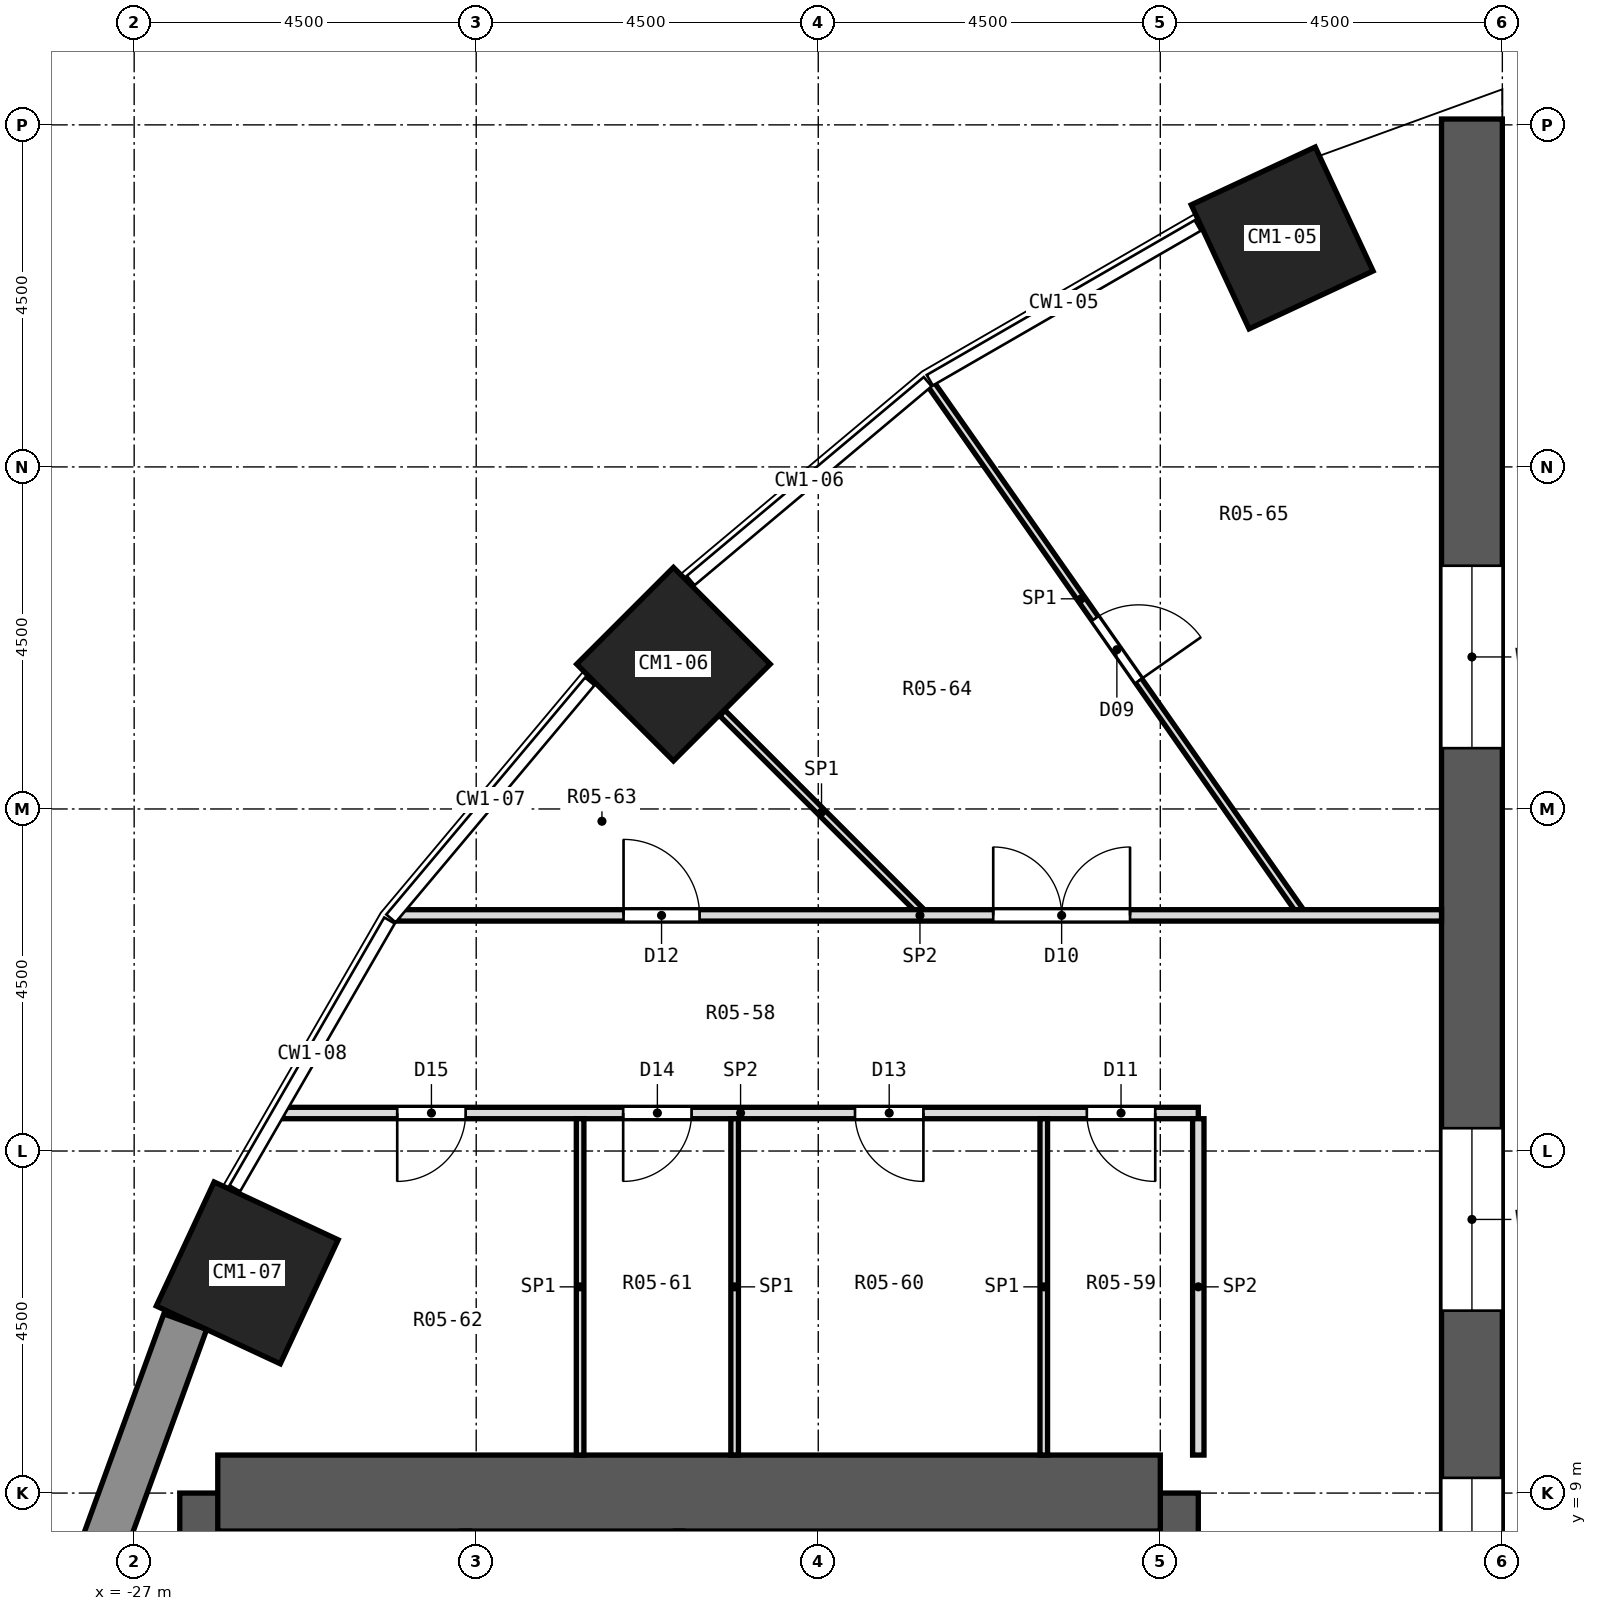
"""IFC4 building model, lengths in metres.
Left out: names, types, materials, properties, quantities, classifications, styles, units other than length and angle.
Written with IfcOpenShell. Run it as: python <this file> out.ifc"""

import sys

from ifc_helpers import new_model, si_unit, direction, frame, frame_2d, origin, origin_2d, place, context, subcontext, project, spatial, polyline, rectangle, outline, extrude, element, fill, save


model = new_model("IFC4")
c1 = context("Model", 3, precision=1e-05, world=origin(), true_north=direction((0.0, 1.0)))
c2 = subcontext(c1, "Body", "Model", "MODEL_VIEW")
j1 = project(units=[si_unit("LENGTHUNIT", "METRE"), si_unit("PLANEANGLEUNIT", "RADIAN")], contexts=[c1])
p1 = place(None, origin())
s1 = spatial("IfcSite", under=j1, at=p1, CompositionType="ELEMENT")
p2 = place(p1, origin())
s2 = spatial("IfcBuilding", under=s1, at=p2, CompositionType="ELEMENT")
p3 = place(p2, frame((0.0, 0.0, 9.2)))
s3 = spatial("IfcBuildingStorey", under=s2, at=p3, CompositionType="ELEMENT", Elevation=9.2)
for number, where, z_axis, x_axis in (
    (1, (-11.897, 25.512, 0.0), (0.0, 0.0, 1.0), (-0.423, 0.906, 0.0)),
    (2, (-19.905, 19.905, 0.0), (0.0, 0.0, 1.0), (-0.707, 0.707, 0.0)),
    (3, (-25.512, 11.897, 0.0), (0.0, 0.0, 1.0), (-0.906, 0.423, 0.0)),
):
    element("IfcColumn", number, at=place(p3, frame(where, z_axis=z_axis, x_axis=x_axis)), inside=s3, PredefinedType="COLUMN", context=c2, shape_type="SweptSolid", body=[
        extrude(rectangle(XDim=1.8, YDim=1.8, at=origin_2d()), origin(), (0.0, 0.0, 1.0), 4.2),
    ])
p4 = place(p3, frame((-13.5, -9.0, 0.0), z_axis=(0.0, 0.0, 1.0), x_axis=(0.0, 1.0, 0.0)))
e4 = element("IfcWall", 4, at=p4, inside=s3, PredefinedType="SHEAR", context=c2, shape_type="SweptSolid", body=[
    extrude(rectangle(XDim=18.0, YDim=1.0, at=frame_2d((9.0, 0.0))), origin(), (0.0, 0.0, 1.0), 4.2),
])
p5 = place(p4, frame((15.4, 0.0, 0.0)))
e5 = element("IfcOpeningElement", 5, at=p5, cuts=e4, PredefinedType="OPENING", context=c2, shape_type="SweptSolid", body=[
    extrude(rectangle(XDim=1.2, YDim=2.1, at=frame_2d((0.6, 1.05))), frame((0.0, 0.512, 0.0), z_axis=(0.0, -1.0, 0.0), x_axis=(1.0, 0.0, 0.0)), (0.0, 0.0, 1.0), 1.024),
])
p6 = place(p4, frame((1.4, 0.0, 0.0)))
e6 = element("IfcOpeningElement", 6, at=p6, cuts=e4, PredefinedType="OPENING", context=c2, shape_type="SweptSolid", body=[
    extrude(rectangle(XDim=1.2, YDim=2.1, at=frame_2d((0.6, 1.05))), frame((0.0, 0.512, 0.0), z_axis=(0.0, -1.0, 0.0), x_axis=(1.0, 0.0, 0.0)), (0.0, 0.0, 1.0), 1.024),
])
p7 = place(p4, frame((7.5, 0.0, 0.0)))
e7 = element("IfcOpeningElement", 7, at=p7, cuts=e4, PredefinedType="OPENING", context=c2, shape_type="SweptSolid", body=[
    extrude(rectangle(XDim=3.0, YDim=2.4, at=frame_2d((1.5, 1.2))), frame((0.0, 0.512, 0.0), z_axis=(0.0, -1.0, 0.0), x_axis=(1.0, 0.0, 0.0)), (0.0, 0.0, 1.0), 1.024),
])
p8 = place(p3, frame((-25.9, -9.0, 0.0), z_axis=(0.0, 0.0, 1.0), x_axis=(0.0, 1.0, 0.0)))
e8 = element("IfcWall", 8, at=p8, inside=s3, PredefinedType="SHEAR", context=c2, shape_type="SweptSolid", body=[
    extrude(rectangle(XDim=18.0, YDim=1.0, at=frame_2d((9.0, 0.0))), origin(), (0.0, 0.0, 1.0), 4.2),
])
p9 = place(p3, frame((-13.5, 9.0, 0.0), z_axis=(0.0, 0.0, 1.0), x_axis=(-1.0, 0.0, 0.0)))
e9 = element("IfcWall", 9, at=p9, inside=s3, PredefinedType="SHEAR", context=c2, shape_type="SweptSolid", body=[
    extrude(rectangle(XDim=12.4, YDim=1.0, at=frame_2d((6.2, 0.0))), origin(), (0.0, 0.0, 1.0), 4.2),
])
p10 = place(p3, frame((-9.4, -27.077, 0.0), z_axis=(0.0, 0.0, 1.0), x_axis=(0.0, 1.0, 0.0)))
e10 = element("IfcWall", 10, at=p10, inside=s3, PredefinedType="SHEAR", context=c2, shape_type="SweptSolid", body=[
    extrude(rectangle(XDim=54.154, YDim=0.8, at=frame_2d((27.077, 0.0))), origin(), (0.0, 0.0, 1.0), 4.2),
])
p11 = place(p10, frame((13.277, 0.0, 0.9)))
e11 = element("IfcOpeningElement", 11, at=p11, cuts=e10, PredefinedType="OPENING", context=c2, shape_type="SweptSolid", body=[
    extrude(rectangle(XDim=2.4, YDim=2.1, at=frame_2d((1.2, 1.05))), frame((0.0, 0.412, 0.0), z_axis=(0.0, -1.0, 0.0), x_axis=(1.0, 0.0, 0.0)), (0.0, 0.0, 1.0), 0.824),
])
p12 = place(p10, frame((17.877, 0.0, 0.9)))
e12 = element("IfcOpeningElement", 12, at=p12, cuts=e10, PredefinedType="OPENING", context=c2, shape_type="SweptSolid", body=[
    extrude(rectangle(XDim=2.4, YDim=2.1, at=frame_2d((1.2, 1.05))), frame((0.0, 0.412, 0.0), z_axis=(0.0, -1.0, 0.0), x_axis=(1.0, 0.0, 0.0)), (0.0, 0.0, 1.0), 0.824),
])
p13 = place(p10, frame((22.477, 0.0, 0.9)))
e13 = element("IfcOpeningElement", 13, at=p13, cuts=e10, PredefinedType="OPENING", context=c2, shape_type="SweptSolid", body=[
    extrude(rectangle(XDim=2.4, YDim=2.1, at=frame_2d((1.2, 1.05))), frame((0.0, 0.412, 0.0), z_axis=(0.0, -1.0, 0.0), x_axis=(1.0, 0.0, 0.0)), (0.0, 0.0, 1.0), 0.824),
])
p14 = place(p10, frame((29.277, 0.0, 0.9)))
e14 = element("IfcOpeningElement", 14, at=p14, cuts=e10, PredefinedType="OPENING", context=c2, shape_type="SweptSolid", body=[
    extrude(rectangle(XDim=2.4, YDim=2.1, at=frame_2d((1.2, 1.05))), frame((0.0, 0.412, 0.0), z_axis=(0.0, -1.0, 0.0), x_axis=(1.0, 0.0, 0.0)), (0.0, 0.0, 1.0), 0.824),
])
p15 = place(p10, frame((33.877, 0.0, 0.9)))
e15 = element("IfcOpeningElement", 15, at=p15, cuts=e10, PredefinedType="OPENING", context=c2, shape_type="SweptSolid", body=[
    extrude(rectangle(XDim=2.4, YDim=2.1, at=frame_2d((1.2, 1.05))), frame((0.0, 0.412, 0.0), z_axis=(0.0, -1.0, 0.0), x_axis=(1.0, 0.0, 0.0)), (0.0, 0.0, 1.0), 0.824),
])
p16 = place(p10, frame((38.477, 0.0, 0.9)))
e16 = element("IfcOpeningElement", 16, at=p16, cuts=e10, PredefinedType="OPENING", context=c2, shape_type="SweptSolid", body=[
    extrude(rectangle(XDim=2.4, YDim=2.1, at=frame_2d((1.2, 1.05))), frame((0.0, 0.412, 0.0), z_axis=(0.0, -1.0, 0.0), x_axis=(1.0, 0.0, 0.0)), (0.0, 0.0, 1.0), 0.824),
])
p17 = place(p10, frame((5.877, 0.0, 0.9)))
e17 = element("IfcOpeningElement", 17, at=p17, cuts=e10, PredefinedType="OPENING", context=c2, shape_type="SweptSolid", body=[
    extrude(rectangle(XDim=2.4, YDim=2.1, at=frame_2d((1.2, 1.05))), frame((0.0, 0.412, 0.0), z_axis=(0.0, -1.0, 0.0), x_axis=(1.0, 0.0, 0.0)), (0.0, 0.0, 1.0), 0.824),
])
p18 = place(p10, frame((45.877, 0.0, 0.9)))
e18 = element("IfcOpeningElement", 18, at=p18, cuts=e10, PredefinedType="OPENING", context=c2, shape_type="SweptSolid", body=[
    extrude(rectangle(XDim=2.4, YDim=2.1, at=frame_2d((1.2, 1.05))), frame((0.0, 0.412, 0.0), z_axis=(0.0, -1.0, 0.0), x_axis=(1.0, 0.0, 0.0)), (0.0, 0.0, 1.0), 0.824),
])
p19 = place(p3, frame((-26.328, 11.255, 0.0), z_axis=(0.0, 0.0, 1.0), x_axis=(-0.342034744565, -0.939687306241, 0.0)))
e19 = element("IfcWall", 19, at=p19, inside=s3, PredefinedType="SOLIDWALL", context=c2, shape_type="SweptSolid", body=[
    extrude(rectangle(XDim=4.099, YDim=0.6, at=frame_2d((2.05, 0.0))), origin(), (0.0, 0.0, 1.0), 3.65),
])
p20 = place(p3, frame((-11.634, 26.49, 0.0), z_axis=(-0.342078632434, 0.939669193197, 0.002004142629), x_axis=(0.939671080385, 0.342079319292, 7.3534e-08)))
e20 = element("IfcWall", 20, at=p20, inside=s3, PredefinedType="SOLIDWALL", context=c2, shape_type="SweptSolid", body=[
    extrude(outline(polyline([(0.0, 0.0), (1.949, -2.168e-19), (2.015, -0.343), (2.328, -1.495), (2.727, -2.622), (3.211, -3.719), (3.467, -4.2), (2.81, -4.2), (2.81, -3.65), (-4.405e-05, -3.65), (0.0, 0.0)])), origin(), (0.0, 0.0, -1.0), 0.38),
])
p21 = place(p3, frame((-16.519, 23.591, 0.0), z_axis=(0.0, 0.0, 1.0), x_axis=(0.573574670768, -0.819153280561, 0.0)))
e21 = element("IfcWall", 21, at=p21, inside=s3, PredefinedType="PARTITIONING", context=c2, shape_type="SweptSolid", body=[
    extrude(rectangle(XDim=8.46, YDim=0.1, at=frame_2d((4.23, 0.0))), origin(), (0.0, 0.0, 1.0), 3.65),
])
p22 = place(p21, frame((3.768, 0.0, 0.0)))
e22 = element("IfcOpeningElement", 22, at=p22, cuts=e21, PredefinedType="OPENING", context=c2, shape_type="SweptSolid", body=[
    extrude(rectangle(XDim=1.0, YDim=2.1, at=frame_2d((0.5, 1.05))), frame((0.0, 0.062, 0.0), z_axis=(0.0, -1.0, 0.0), x_axis=(1.0, 0.0, 0.0)), (0.0, 0.0, 1.0), 0.124),
])
p23 = place(p3, frame((-19.262, 19.262, 0.0), z_axis=(0.0, 0.0, 1.0), x_axis=(0.707106781187, -0.707106781187, 0.0)))
e23 = element("IfcWall", 23, at=p23, inside=s3, PredefinedType="PARTITIONING", context=c2, shape_type="SweptSolid", body=[
    extrude(rectangle(XDim=3.689, YDim=0.1, at=frame_2d((1.845, 0.0))), origin(), (0.0, 0.0, 1.0), 3.65),
])
p24 = place(p3, frame((-25.045, 14.0, 0.0), z_axis=(0.0, 0.0, 1.0), x_axis=(1.0, 0.0, 0.0)))
e24 = element("IfcWall", 24, at=p24, inside=s3, PredefinedType="PARTITIONING", context=c2, shape_type="SweptSolid", body=[
    extrude(rectangle(XDim=12.045, YDim=0.15, at=frame_2d((6.022, 0.0))), origin(), (0.0, 0.0, 1.0), 3.65),
])
p25 = place(p24, frame((10.579, 0.0, 0.0)))
e25 = element("IfcOpeningElement", 25, at=p25, cuts=e24, PredefinedType="OPENING", context=c2, shape_type="SweptSolid", body=[
    extrude(rectangle(XDim=0.9, YDim=2.1, at=frame_2d((0.45, 1.05))), frame((0.0, 0.087, 0.0), z_axis=(0.0, -1.0, 0.0), x_axis=(1.0, 0.0, 0.0)), (0.0, 0.0, 1.0), 0.174),
])
p26 = place(p24, frame((7.529, 0.0, 0.0)))
e26 = element("IfcOpeningElement", 26, at=p26, cuts=e24, PredefinedType="OPENING", context=c2, shape_type="SweptSolid", body=[
    extrude(rectangle(XDim=0.9, YDim=2.1, at=frame_2d((0.45, 1.05))), frame((0.0, 0.087, 0.0), z_axis=(0.0, -1.0, 0.0), x_axis=(1.0, 0.0, 0.0)), (0.0, 0.0, 1.0), 0.174),
])
p27 = place(p24, frame((4.479, 0.0, 0.0)))
e27 = element("IfcOpeningElement", 27, at=p27, cuts=e24, PredefinedType="OPENING", context=c2, shape_type="SweptSolid", body=[
    extrude(rectangle(XDim=0.9, YDim=2.1, at=frame_2d((0.45, 1.05))), frame((0.0, 0.087, 0.0), z_axis=(0.0, -1.0, 0.0), x_axis=(1.0, 0.0, 0.0)), (0.0, 0.0, 1.0), 0.174),
])
p28 = place(p24, frame((1.506, 0.0, 0.0)))
e28 = element("IfcOpeningElement", 28, at=p28, cuts=e24, PredefinedType="OPENING", context=c2, shape_type="SweptSolid", body=[
    extrude(rectangle(XDim=0.9, YDim=2.1, at=frame_2d((0.45, 1.05))), frame((0.0, 0.087, 0.0), z_axis=(0.0, -1.0, 0.0), x_axis=(1.0, 0.0, 0.0)), (0.0, 0.0, 1.0), 0.174),
])
p29 = place(p3, frame((-23.523, 16.6, 0.0), z_axis=(0.0, 0.0, 1.0), x_axis=(1.0, 0.0, 0.0)))
e29 = element("IfcWall", 29, at=p29, inside=s3, PredefinedType="PARTITIONING", context=c2, shape_type="SweptSolid", body=[
    extrude(rectangle(XDim=13.723, YDim=0.15, at=frame_2d((6.861, 0.0))), origin(), (0.0, 0.0, 1.0), 3.65),
])
p30 = place(p29, frame((7.825, 0.0, 0.0)))
e30 = element("IfcOpeningElement", 30, at=p30, cuts=e29, PredefinedType="OPENING", context=c2, shape_type="SweptSolid", body=[
    extrude(rectangle(XDim=1.8, YDim=2.1, at=frame_2d((0.9, 1.05))), frame((0.0, 0.087, 0.0), z_axis=(0.0, -1.0, 0.0), x_axis=(1.0, 0.0, 0.0)), (0.0, 0.0, 1.0), 0.174),
])
p31 = place(p29, frame((2.961, 0.0, 0.0)))
e31 = element("IfcOpeningElement", 31, at=p31, cuts=e29, PredefinedType="OPENING", context=c2, shape_type="SweptSolid", body=[
    extrude(rectangle(XDim=1.0, YDim=2.1, at=frame_2d((0.5, 1.05))), frame((0.0, 0.087, 0.0), z_axis=(0.0, -1.0, 0.0), x_axis=(1.0, 0.0, 0.0)), (0.0, 0.0, 1.0), 0.174),
])
p32 = place(p3, frame((-13.0, 9.5, 0.0), z_axis=(0.0, 0.0, 1.0), x_axis=(0.0, 1.0, 0.0)))
e32 = element("IfcWall", 32, at=p32, inside=s3, PredefinedType="PARTITIONING", context=c2, shape_type="SweptSolid", body=[
    extrude(rectangle(XDim=4.425, YDim=0.15, at=frame_2d((2.212, 0.0))), origin(), (0.0, 0.0, 1.0), 3.65),
])
for number, where, z_axis, x_axis in (
    (33, (-15.033, 9.5, 0.0), (0.0, 0.0, 1.0), (0.0, 1.0, 0.0)),
    (34, (-19.1, 9.5, 0.0), (0.0, 0.0, 1.0), (0.0, 1.0, 0.0)),
    (35, (-21.133, 9.5, 0.0), (0.0, 0.0, 1.0), (0.0, 1.0, 0.0)),
):
    element("IfcWall", number, at=place(p3, frame(where, z_axis=z_axis, x_axis=x_axis)), inside=s3, PredefinedType="PARTITIONING", context=c2, shape_type="SweptSolid", body=[
        extrude(rectangle(XDim=4.425, YDim=0.1, at=frame_2d((2.212, 0.0))), origin(), (0.0, 0.0, 1.0), 3.65),
    ])
p33 = place(p3, frame((-19.83, 5.3, 0.0), z_axis=(0.0, 0.0, 1.0), x_axis=(0.0, 1.0, 0.0)))
e36 = element("IfcWall", 36, at=p33, inside=s3, PredefinedType="PARTITIONING", context=c2, shape_type="SweptSolid", body=[
    extrude(rectangle(XDim=3.2, YDim=0.1, at=frame_2d((1.6, 0.0))), origin(), (0.0, 0.0, 1.0), 3.65),
])
p34 = place(p3, frame((-22.64, 5.3, 0.0), z_axis=(0.0, 0.0, 1.0), x_axis=(0.0, 1.0, 0.0)))
e37 = element("IfcWall", 37, at=p34, inside=s3, PredefinedType="PARTITIONING", context=c2, shape_type="SweptSolid", body=[
    extrude(rectangle(XDim=3.2, YDim=0.1, at=frame_2d((1.6, 0.0))), origin(), (0.0, 0.0, 1.0), 3.65),
])
p35 = place(p34, frame((1.15, 0.0, 0.0)))
e38 = element("IfcOpeningElement", 38, at=p35, cuts=e37, PredefinedType="OPENING", context=c2, shape_type="SweptSolid", body=[
    extrude(rectangle(XDim=0.9, YDim=2.1, at=frame_2d((0.45, 1.05))), frame((0.0, 0.062, 0.0), z_axis=(0.0, -1.0, 0.0), x_axis=(1.0, 0.0, 0.0)), (0.0, 0.0, 1.0), 0.124),
])
p36 = place(p22, origin())
e39 = element("IfcDoor", 39, at=p36, inside=s3, OperationType="SINGLE_SWING_RIGHT", PredefinedType="DOOR", context=c2, shape_type="SweptSolid", body=[
    extrude(rectangle(XDim=1.0, YDim=2.1, at=frame_2d((0.5, 1.05))), frame((0.0, 0.025, 0.0), z_axis=(0.0, -1.0, 0.0), x_axis=(1.0, 0.0, 0.0)), (0.0, 0.0, 1.0), 0.05),
])
fill(e22, e39)
p37 = place(p30, origin())
e40 = element("IfcDoor", 40, at=p37, inside=s3, OperationType="DOUBLE_DOOR_SINGLE_SWING", PredefinedType="DOOR", context=c2, shape_type="SweptSolid", body=[
    extrude(rectangle(XDim=1.8, YDim=2.1, at=frame_2d((0.9, 1.05))), frame((0.0, 0.025, 0.0), z_axis=(0.0, -1.0, 0.0), x_axis=(1.0, 0.0, 0.0)), (0.0, 0.0, 1.0), 0.05),
])
fill(e30, e40)
p38 = place(p25, frame((0.9, 0.0, 0.0), z_axis=(0.0, 0.0, 1.0), x_axis=(-1.0, 0.0, 0.0)))
e41 = element("IfcDoor", 41, at=p38, inside=s3, OperationType="SINGLE_SWING_LEFT", PredefinedType="DOOR", context=c2, shape_type="SweptSolid", body=[
    extrude(rectangle(XDim=0.9, YDim=2.1, at=frame_2d((0.45, 1.05))), frame((0.0, 0.025, 0.0), z_axis=(0.0, -1.0, 0.0), x_axis=(1.0, 0.0, 0.0)), (0.0, 0.0, 1.0), 0.05),
])
fill(e25, e41)
p39 = place(p31, origin())
e42 = element("IfcDoor", 42, at=p39, inside=s3, OperationType="SINGLE_SWING_LEFT", PredefinedType="DOOR", context=c2, shape_type="SweptSolid", body=[
    extrude(rectangle(XDim=1.0, YDim=2.1, at=frame_2d((0.5, 1.05))), frame((0.0, 0.025, 0.0), z_axis=(0.0, -1.0, 0.0), x_axis=(1.0, 0.0, 0.0)), (0.0, 0.0, 1.0), 0.05),
])
fill(e31, e42)
p40 = place(p26, frame((0.9, 0.0, 0.0), z_axis=(0.0, 0.0, 1.0), x_axis=(-1.0, 0.0, 0.0)))
e43 = element("IfcDoor", 43, at=p40, inside=s3, OperationType="SINGLE_SWING_LEFT", PredefinedType="DOOR", context=c2, shape_type="SweptSolid", body=[
    extrude(rectangle(XDim=0.9, YDim=2.1, at=frame_2d((0.45, 1.05))), frame((0.0, 0.025, 0.0), z_axis=(0.0, -1.0, 0.0), x_axis=(1.0, 0.0, 0.0)), (0.0, 0.0, 1.0), 0.05),
])
fill(e26, e43)
p41 = place(p27, frame((0.9, 0.0, 0.0), z_axis=(0.0, 0.0, 1.0), x_axis=(-1.0, 0.0, 0.0)))
e44 = element("IfcDoor", 44, at=p41, inside=s3, OperationType="SINGLE_SWING_RIGHT", PredefinedType="DOOR", context=c2, shape_type="SweptSolid", body=[
    extrude(rectangle(XDim=0.9, YDim=2.1, at=frame_2d((0.45, 1.05))), frame((0.0, 0.025, 0.0), z_axis=(0.0, -1.0, 0.0), x_axis=(1.0, 0.0, 0.0)), (0.0, 0.0, 1.0), 0.05),
])
fill(e27, e44)
p42 = place(p28, frame((0.9, 0.0, 0.0), z_axis=(0.0, 0.0, 1.0), x_axis=(-1.0, 0.0, 0.0)))
e45 = element("IfcDoor", 45, at=p42, inside=s3, OperationType="SINGLE_SWING_RIGHT", PredefinedType="DOOR", context=c2, shape_type="SweptSolid", body=[
    extrude(rectangle(XDim=0.9, YDim=2.1, at=frame_2d((0.45, 1.05))), frame((0.0, 0.025, 0.0), z_axis=(0.0, -1.0, 0.0), x_axis=(1.0, 0.0, 0.0)), (0.0, 0.0, 1.0), 0.05),
])
fill(e28, e45)
p43 = place(p15, origin())
e46 = element("IfcWindow", 46, at=p43, inside=s3, PartitioningType="SINGLE_PANEL", PredefinedType="WINDOW", context=c2, shape_type="SweptSolid", body=[
    extrude(rectangle(XDim=2.4, YDim=2.1, at=frame_2d((1.2, 1.05))), frame((0.0, 0.03, 0.0), z_axis=(0.0, -1.0, 0.0), x_axis=(1.0, 0.0, 0.0)), (0.0, 0.0, 1.0), 0.06),
])
fill(e15, e46)
p44 = place(p16, origin())
e47 = element("IfcWindow", 47, at=p44, inside=s3, PartitioningType="SINGLE_PANEL", PredefinedType="WINDOW", context=c2, shape_type="SweptSolid", body=[
    extrude(rectangle(XDim=2.4, YDim=2.1, at=frame_2d((1.2, 1.05))), frame((0.0, 0.03, 0.0), z_axis=(0.0, -1.0, 0.0), x_axis=(1.0, 0.0, 0.0)), (0.0, 0.0, 1.0), 0.06),
])
fill(e16, e47)
p45 = place(p18, origin())
e48 = element("IfcWindow", 48, at=p45, inside=s3, PartitioningType="SINGLE_PANEL", PredefinedType="WINDOW", context=c2, shape_type="SweptSolid", body=[
    extrude(rectangle(XDim=2.4, YDim=2.1, at=frame_2d((1.2, 1.05))), frame((0.0, 0.03, 0.0), z_axis=(0.0, -1.0, 0.0), x_axis=(1.0, 0.0, 0.0)), (0.0, 0.0, 1.0), 0.06),
])
fill(e18, e48)
save(model, sys.argv[1])
